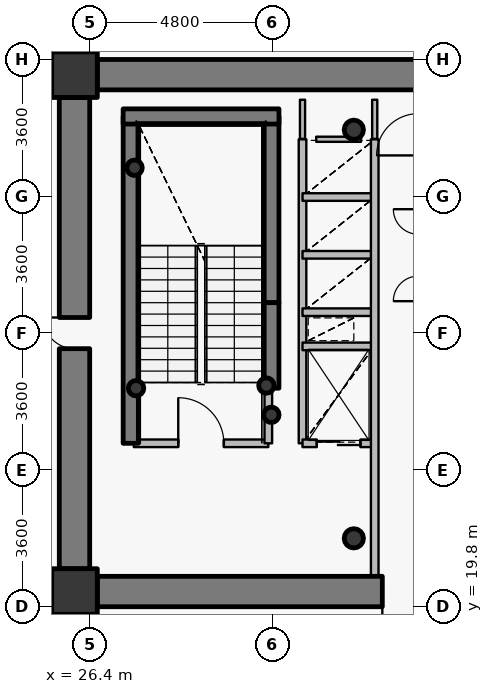
"""IFC4 building model, lengths in metres.
Left out: names, types, materials, properties, quantities, classifications, styles, units other than length and angle.
Written with IfcOpenShell. Run it as: python <this file> out.ifc"""

import sys

from ifc_helpers import new_model, si_unit, direction, frame, frame_2d, origin, origin_2d, place, context, subcontext, project, spatial, rectangle, hollow_circle, extrude, source, transform, mapped, element, fill, save


model = new_model("IFC4")
c1 = context("Model", 3, precision=1e-05, world=origin(), true_north=direction((0.0, 1.0)))
c2 = subcontext(c1, "Body", "Model", "MODEL_VIEW")
j1 = project(units=[si_unit("LENGTHUNIT", "METRE"), si_unit("PLANEANGLEUNIT", "RADIAN")], contexts=[c1])
p1 = place(None, origin())
s1 = spatial("IfcSite", under=j1, at=p1, CompositionType="ELEMENT")
p2 = place(p1, origin())
s2 = spatial("IfcBuilding", under=s1, at=p2, CompositionType="ELEMENT")
p3 = place(p2, frame((0.0, 0.0, 119.7)))
s3 = spatial("IfcBuildingStorey", under=s2, at=p3, CompositionType="ELEMENT", Elevation=119.7)
for number, where, z_axis, x_axis in (
    (1, (26.0, 20.2, 0.0), (0.0, 0.0, 1.0), (1.0, 0.0, 0.0)),
    (2, (26.0, 33.8, 0.0), (0.0, 0.0, 1.0), (1.0, 0.0, 0.0)),
):
    element("IfcColumn", number, at=place(p3, frame(where, z_axis=z_axis, x_axis=x_axis)), inside=s3, PredefinedType="COLUMN", context=c2, shape_type="SweptSolid", body=[
        extrude(rectangle(XDim=1.2, YDim=1.2, at=origin_2d()), origin(), (0.0, 0.0, 1.0), 3.75),
    ])
for number, where, z_axis, x_axis in (
    (3, (33.35, 21.6, 0.0), (0.0, 0.0, 1.0), (1.0, 0.0, 0.0)),
    (4, (33.35, 32.35, 0.0), (0.0, 0.0, 1.0), (1.0, 0.0, 0.0)),
):
    element("IfcColumn", number, at=place(p3, frame(where, z_axis=z_axis, x_axis=x_axis)), inside=s3, PredefinedType="COLUMN", context=c2, shape_type="SweptSolid", body=[
        extrude(hollow_circle(Radius=0.254, WallThickness=0.02, at=origin_2d()), origin(), (0.0, 0.0, 1.0), 3.75),
    ])
p4 = place(p3, frame((27.48, 24.1, 0.0), z_axis=(0.0, 0.0, 1.0), x_axis=(0.0, 1.0, 0.0)))
e5 = element("IfcWall", 5, at=p4, inside=s3, PredefinedType="SHEAR", context=c2, shape_type="SweptSolid", body=[
    extrude(rectangle(XDim=8.6, YDim=0.4, at=frame_2d((4.3, 0.0))), origin(), (0.0, 0.0, 1.0), 3.75),
])
p5 = place(p3, frame((31.18, 27.8, 0.0), z_axis=(0.0, 0.0, 1.0), x_axis=(0.0, 1.0, 0.0)))
e6 = element("IfcWall", 6, at=p5, inside=s3, PredefinedType="SHEAR", context=c2, shape_type="SweptSolid", body=[
    extrude(rectangle(XDim=4.9, YDim=0.4, at=frame_2d((2.45, 0.0))), origin(), (0.0, 0.0, 1.0), 3.75),
])
p6 = place(p3, frame((27.28, 32.7, 0.0), z_axis=(0.0, 0.0, 1.0), x_axis=(1.0, 0.0, 0.0)))
e7 = element("IfcWall", 7, at=p6, inside=s3, PredefinedType="SHEAR", context=c2, shape_type="SweptSolid", body=[
    extrude(rectangle(XDim=4.1, YDim=0.4, at=frame_2d((2.05, 0.0))), origin(), (0.0, 0.0, 1.0), 3.75),
])
for number, where, z_axis, x_axis in (
    (8, (27.58, 31.35, 0.0), (0.0, 0.0, 1.0), (1.0, 0.0, 0.0)),
    (9, (31.05, 25.62, 0.0), (0.0, 0.0, 1.0), (1.0, 0.0, 0.0)),
    (10, (31.18, 24.85, 0.0), (0.0, 0.0, 1.0), (1.0, 0.0, 0.0)),
    (11, (27.62, 25.55, 0.0), (0.0, 0.0, 1.0), (1.0, 0.0, 0.0)),
):
    element("IfcColumn", number, at=place(p3, frame(where, z_axis=z_axis, x_axis=x_axis)), inside=s3, PredefinedType="COLUMN", context=c2, shape_type="SweptSolid", body=[
        extrude(hollow_circle(Radius=0.203, WallThickness=0.016, at=origin_2d()), origin(), (0.0, 0.0, 1.0), 3.75),
    ])
p7 = place(p3, frame((26.6, 33.8, 0.0), z_axis=(0.0, 0.0, 1.0), x_axis=(1.0, 0.0, 0.0)))
e12 = element("IfcWall", 12, at=p7, inside=s3, PredefinedType="SHEAR", context=c2, shape_type="SweptSolid", body=[
    extrude(rectangle(XDim=18.8, YDim=0.8, at=frame_2d((9.4, 0.0))), origin(), (0.0, 0.0, 1.0), 2.95),
])
p8 = place(p3, frame((45.4, 20.2, 0.0), z_axis=(0.0, 0.0, 1.0), x_axis=(-1.0, 0.0, 0.0)))
e13 = element("IfcWall", 13, at=p8, inside=s3, PredefinedType="SHEAR", context=c2, shape_type="SweptSolid", body=[
    extrude(rectangle(XDim=18.8, YDim=0.8, at=frame_2d((9.4, 0.0))), origin(), (0.0, 0.0, 1.0), 2.95),
])
p9 = place(p8, frame((10.15, 0.0, 0.0)))
e14 = element("IfcOpeningElement", 14, at=p9, cuts=e13, PredefinedType="OPENING", context=c2, shape_type="SweptSolid", body=[
    extrude(rectangle(XDim=1.15, YDim=2.15, at=origin_2d()), frame((0.575, 0.41, 1.075), z_axis=(0.0, -1.0, 0.0), x_axis=(1.0, 0.0, 0.0)), (0.0, 0.0, 1.0), 0.82),
])
p10 = place(p3, frame((26.0, 20.8, 0.0), z_axis=(0.0, 0.0, 1.0), x_axis=(0.0, 1.0, 0.0)))
e15 = element("IfcWall", 15, at=p10, inside=s3, PredefinedType="SHEAR", context=c2, shape_type="SweptSolid", body=[
    extrude(rectangle(XDim=12.4, YDim=0.8, at=frame_2d((6.2, 0.0))), origin(), (0.0, 0.0, 1.0), 2.95),
])
p11 = place(p10, frame((5.79, 0.0, 0.0)))
e16 = element("IfcOpeningElement", 16, at=p11, cuts=e15, PredefinedType="OPENING", context=c2, shape_type="SweptSolid", body=[
    extrude(rectangle(XDim=0.82, YDim=2.1, at=origin_2d()), frame((0.41, 0.41, 1.05), z_axis=(0.0, -1.0, 0.0), x_axis=(1.0, 0.0, 0.0)), (0.0, 0.0, 1.0), 0.82),
])
p12 = place(p3, frame((31.18, 25.55, 0.0), z_axis=(0.0, 0.0, 1.0), x_axis=(0.0, 1.0, 0.0)))
e17 = element("IfcWall", 17, at=p12, inside=s3, PredefinedType="SHEAR", context=c2, shape_type="SweptSolid", body=[
    extrude(rectangle(XDim=2.25, YDim=0.4, at=frame_2d((1.125, 0.0))), origin(), (0.0, 0.0, 1.0), 3.1),
])
p13 = place(p3, frame((27.56, 24.1, 0.0), z_axis=(0.0, 0.0, 1.0), x_axis=(1.0, 0.0, 0.0)))
e18 = element("IfcWall", 18, at=p13, inside=s3, PredefinedType="PARTITIONING", context=c2, shape_type="SweptSolid", body=[
    extrude(rectangle(XDim=3.54, YDim=0.2, at=frame_2d((1.77, 0.0))), origin(), (0.0, 0.0, 1.0), 3.5),
])
p14 = place(p13, frame((1.17, 0.0, 0.0)))
e19 = element("IfcOpeningElement", 19, at=p14, cuts=e18, PredefinedType="OPENING", context=c2, shape_type="SweptSolid", body=[
    extrude(rectangle(XDim=1.2, YDim=2.15, at=origin_2d()), frame((0.6, 0.11, 1.075), z_axis=(0.0, -1.0, 0.0), x_axis=(1.0, 0.0, 0.0)), (0.0, 0.0, 1.0), 0.22),
])
p15 = place(p3, frame((31.1, 24.1, 0.0), z_axis=(0.0, 0.0, 1.0), x_axis=(0.0, 1.0, 0.0)))
e20 = element("IfcWall", 20, at=p15, inside=s3, PredefinedType="PARTITIONING", context=c2, shape_type="SweptSolid", body=[
    extrude(rectangle(XDim=1.44, YDim=0.2, at=frame_2d((0.72, 0.0))), origin(), (0.0, 0.0, 1.0), 3.5),
])
p16 = place(p3, frame((32.0, 24.1, 0.0), z_axis=(0.0, 0.0, 1.0), x_axis=(0.0, 1.0, 0.0)))
e21 = element("IfcWall", 21, at=p16, inside=s3, PredefinedType="PARTITIONING", context=c2, shape_type="SweptSolid", body=[
    extrude(rectangle(XDim=8.0, YDim=0.2, at=frame_2d((4.0, 0.0))), origin(), (0.0, 0.0, 1.0), 3.5),
])
p17 = place(p3, frame((32.0, 24.1, 0.0), z_axis=(0.0, 0.0, 1.0), x_axis=(1.0, 0.0, 0.0)))
e22 = element("IfcWall", 22, at=p17, inside=s3, PredefinedType="PARTITIONING", context=c2, shape_type="SweptSolid", body=[
    extrude(rectangle(XDim=1.9, YDim=0.2, at=frame_2d((0.95, 0.0))), origin(), (0.0, 0.0, 1.0), 3.085),
])
p18 = place(p17, frame((0.375, 0.0, 0.0)))
e23 = element("IfcOpeningElement", 23, at=p18, cuts=e22, PredefinedType="OPENING", context=c2, shape_type="SweptSolid", body=[
    extrude(rectangle(XDim=1.15, YDim=2.15, at=origin_2d()), frame((0.575, 0.11, 1.075), z_axis=(0.0, -1.0, 0.0), x_axis=(1.0, 0.0, 0.0)), (0.0, 0.0, 1.0), 0.22),
])
for number, where, z_axis, x_axis in (
    (24, (32.0, 26.65, 0.0), (0.0, 0.0, 1.0), (1.0, 0.0, 0.0)),
    (25, (32.0, 27.55, 0.0), (0.0, 0.0, 1.0), (1.0, 0.0, 0.0)),
    (26, (32.0, 29.06, 0.0), (0.0, 0.0, 1.0), (1.0, 0.0, 0.0)),
    (27, (32.0, 30.58, 0.0), (0.0, 0.0, 1.0), (1.0, 0.0, 0.0)),
):
    element("IfcWall", number, at=place(p3, frame(where, z_axis=z_axis, x_axis=x_axis)), inside=s3, PredefinedType="PARTITIONING", context=c2, shape_type="SweptSolid", body=[
        extrude(rectangle(XDim=1.9, YDim=0.2, at=frame_2d((0.95, 0.0))), origin(), (0.0, 0.0, 1.0), 3.085),
    ])
p19 = place(p3, frame((33.9, 20.6, 0.0), z_axis=(0.0, 0.0, 1.0), x_axis=(0.0, 1.0, 0.0)))
e28 = element("IfcWall", 28, at=p19, inside=s3, PredefinedType="PARTITIONING", context=c2, shape_type="SweptSolid", body=[
    extrude(rectangle(XDim=11.5, YDim=0.2, at=frame_2d((5.75, 0.0))), origin(), (0.0, 0.0, 1.0), 3.085),
])
p20 = place(p3, frame((32.36, 32.1, 0.0), z_axis=(0.0, 0.0, 1.0), x_axis=(1.0, 0.0, 0.0)))
e29 = element("IfcWall", 29, at=p20, inside=s3, PredefinedType="PARTITIONING", context=c2, shape_type="SweptSolid", body=[
    extrude(rectangle(XDim=1.18, YDim=0.135, at=frame_2d((0.59, 0.0))), origin(), (0.0, 0.0, 1.0), 3.085),
])
p21 = place(p3, frame((32.0, 33.14, 0.0), z_axis=(0.0, 0.0, 1.0), x_axis=(0.0, -1.0, 0.0)))
e30 = element("IfcWall", 30, at=p21, inside=s3, PredefinedType="PARTITIONING", context=c2, shape_type="SweptSolid", body=[
    extrude(rectangle(XDim=1.03, YDim=0.135, at=frame_2d((0.515, 0.0))), origin(), (0.0, 0.0, 1.0), 3.035),
])
p22 = place(p3, frame((33.9, 32.11, 0.0), z_axis=(0.0, 0.0, 1.0), x_axis=(0.0, 1.0, 0.0)))
e31 = element("IfcWall", 31, at=p22, inside=s3, PredefinedType="PARTITIONING", context=c2, shape_type="SweptSolid", body=[
    extrude(rectangle(XDim=1.03, YDim=0.135, at=frame_2d((0.515, 0.0))), origin(), (0.0, 0.0, 1.0), 3.085),
])
p23 = place(p3, frame((26.59, 34.2, 0.0), z_axis=(0.0, 0.0, 1.0), x_axis=(-1.0, 0.0, 0.0)))
e32 = element("IfcWall", 32, at=p23, inside=s3, PredefinedType="PARTITIONING", context=c2, shape_type="SweptSolid", body=[
    extrude(rectangle(XDim=0.99, YDim=0.135, at=frame_2d((0.495, 0.0))), origin(), (0.0, 0.0, 1.0), 2.935),
])
p24 = place(p3, frame((25.6, 33.893, 0.0), z_axis=(0.0, 0.0, 1.0), x_axis=(0.0, -1.0, 0.0)))
e33 = element("IfcWall", 33, at=p24, inside=s3, PredefinedType="PARTITIONING", context=c2, shape_type="SweptSolid", body=[
    extrude(rectangle(XDim=0.683, YDim=0.135, at=frame_2d((0.341, 0.0))), origin(), (0.0, 0.0, 1.0), 3.5),
])
p25 = place(p3, frame((25.6, 20.79, 0.0), z_axis=(0.0, 0.0, 1.0), x_axis=(0.0, -1.0, 0.0)))
e34 = element("IfcWall", 34, at=p25, inside=s3, PredefinedType="PARTITIONING", context=c2, shape_type="SweptSolid", body=[
    extrude(rectangle(XDim=0.99, YDim=0.135, at=frame_2d((0.495, 0.0))), origin(), (0.0, 0.0, 1.0), 3.5),
])
p26 = place(p3, frame((25.907, 19.8, 0.0), z_axis=(0.0, 0.0, 1.0), x_axis=(1.0, 0.0, 0.0)))
e35 = element("IfcWall", 35, at=p26, inside=s3, PredefinedType="PARTITIONING", context=c2, shape_type="SweptSolid", body=[
    extrude(rectangle(XDim=0.683, YDim=0.135, at=frame_2d((0.341, 0.0))), origin(), (0.0, 0.0, 1.0), 2.935),
])
m1 = source(origin(), c2, "Body", "SweptSolid", [
    extrude(rectangle(XDim=0.82, YDim=2.1, at=origin_2d()), frame((0.41, 0.025, 1.05), z_axis=(0.0, -1.0, 0.0), x_axis=(1.0, 0.0, 0.0)), (0.0, 0.0, 1.0), 0.05),
])
p27 = place(p11, origin())
e36 = element("IfcDoor", 36, at=p27, inside=s3, OperationType="SINGLE_SWING_RIGHT", PredefinedType="DOOR", context=c2, shape_type="MappedRepresentation", body=[
    mapped(m1, transform((0.0, 0.0, 0.0), x_axis=(1.0, 0.0, 0.0), y_axis=(0.0, 1.0, 0.0), z_axis=(0.0, 0.0, 1.0), scale=1.0)),
])
fill(e16, e36)
m2 = source(origin(), c2, "Body", "SweptSolid", [
    extrude(rectangle(XDim=1.15, YDim=2.15, at=origin_2d()), frame((0.575, 0.025, 1.075), z_axis=(0.0, -1.0, 0.0), x_axis=(1.0, 0.0, 0.0)), (0.0, 0.0, 1.0), 0.05),
])
p28 = place(p9, origin())
e37 = element("IfcDoor", 37, at=p28, inside=s3, OperationType="SINGLE_SWING_RIGHT", PredefinedType="DOOR", context=c2, shape_type="MappedRepresentation", body=[
    mapped(m2, transform((0.0, 0.0, 0.0), x_axis=(1.0, 0.0, 0.0), y_axis=(0.0, 1.0, 0.0), z_axis=(0.0, 0.0, 1.0), scale=1.0)),
])
fill(e14, e37)
m3 = source(origin(), c2, "Body", "SweptSolid", [
    extrude(rectangle(XDim=1.2, YDim=2.15, at=origin_2d()), frame((0.6, 0.025, 1.075), z_axis=(0.0, -1.0, 0.0), x_axis=(1.0, 0.0, 0.0)), (0.0, 0.0, 1.0), 0.05),
])
p29 = place(p14, origin())
e38 = element("IfcDoor", 38, at=p29, inside=s3, OperationType="SINGLE_SWING_LEFT", PredefinedType="DOOR", context=c2, shape_type="MappedRepresentation", body=[
    mapped(m3, transform((0.0, 0.0, 0.0), x_axis=(1.0, 0.0, 0.0), y_axis=(0.0, 1.0, 0.0), z_axis=(0.0, 0.0, 1.0), scale=1.0)),
])
fill(e19, e38)
m4 = source(origin(), c2, "Body", "SweptSolid", [
    extrude(rectangle(XDim=1.15, YDim=2.15, at=origin_2d()), frame((0.575, 0.025, 1.075), z_axis=(0.0, -1.0, 0.0), x_axis=(1.0, 0.0, 0.0)), (0.0, 0.0, 1.0), 0.05),
])
p30 = place(p18, origin())
e39 = element("IfcDoor", 39, at=p30, inside=s3, OperationType="DOUBLE_DOOR_SLIDING", PredefinedType="USERDEFINED", context=c2, shape_type="MappedRepresentation", body=[
    mapped(m4, transform((0.0, 0.0, 0.0), x_axis=(1.0, 0.0, 0.0), y_axis=(0.0, 1.0, 0.0), z_axis=(0.0, 0.0, 1.0), scale=1.0)),
])
fill(e23, e39)
save(model, sys.argv[1])
